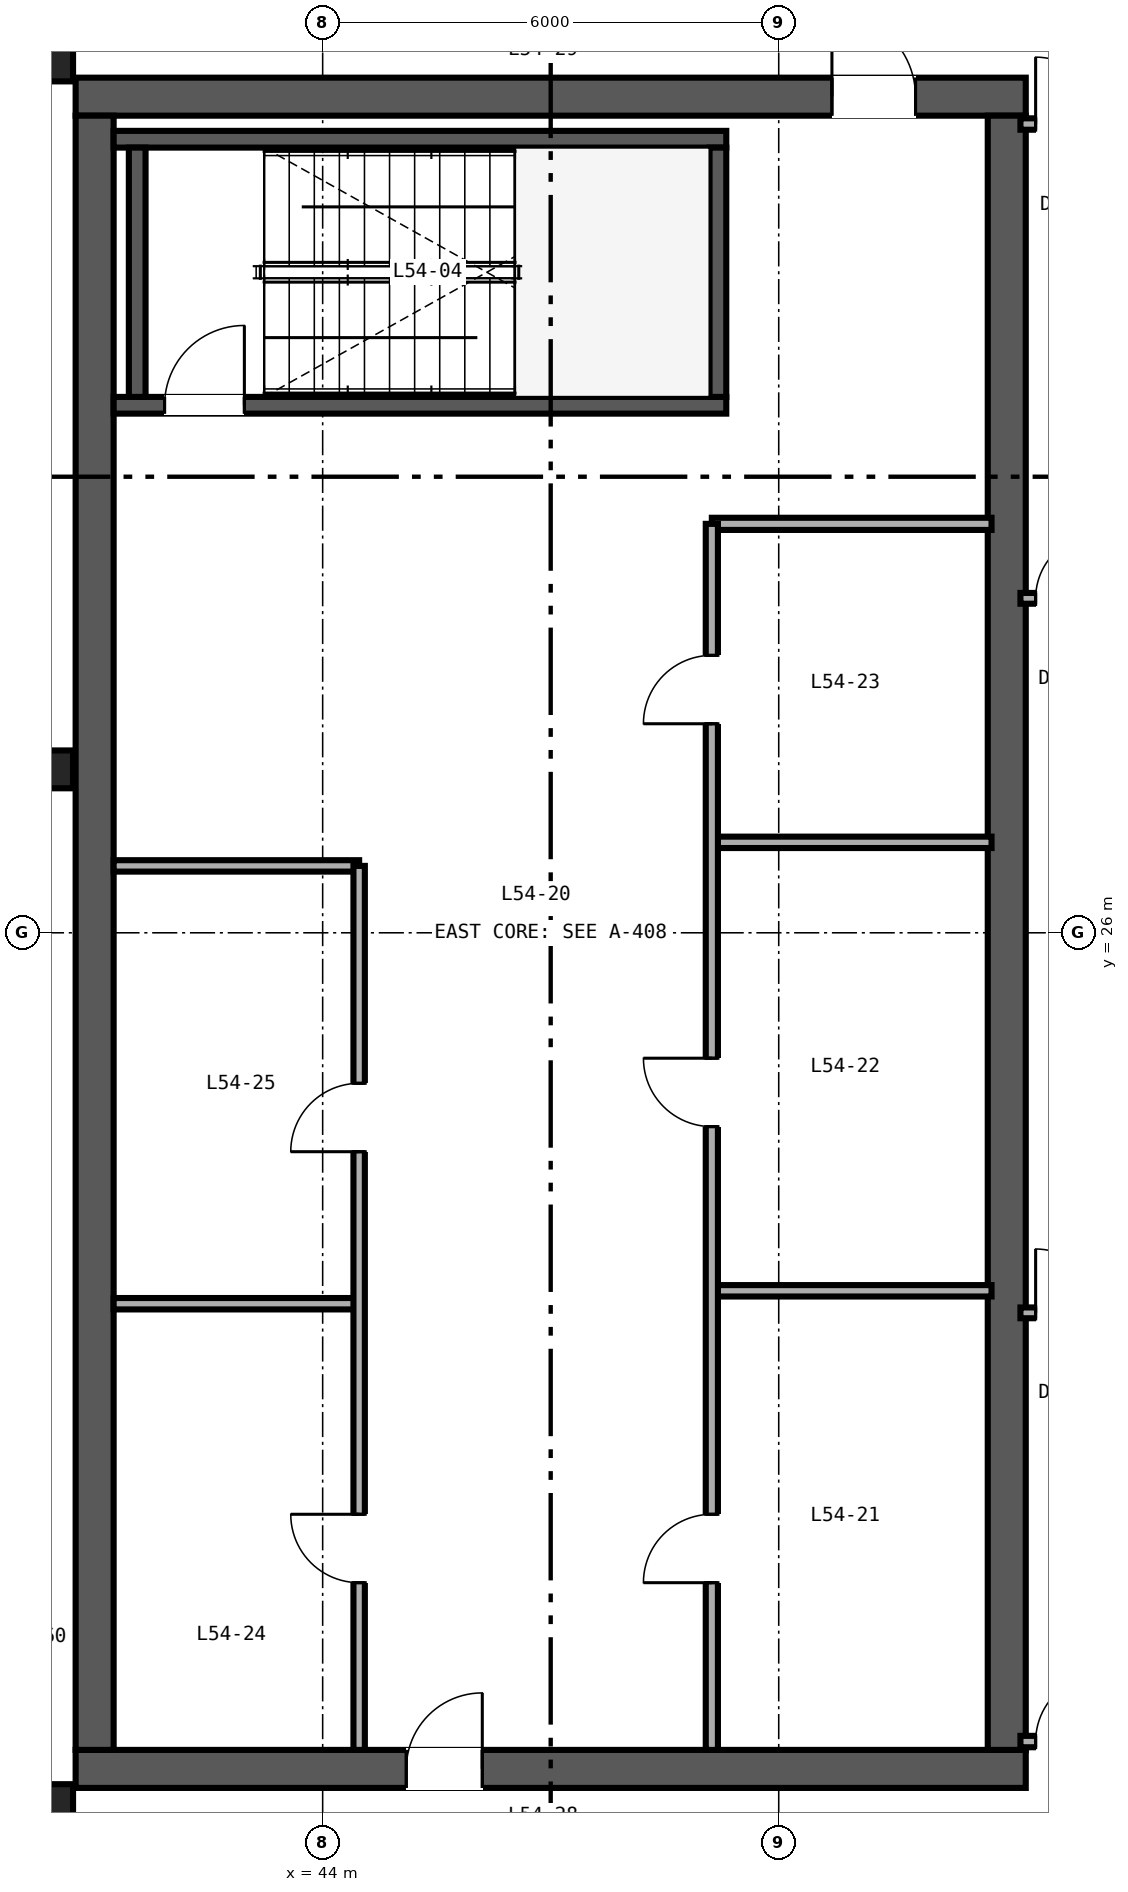
"""IFC4 building model, lengths in metres.
Left out: names, types, materials, properties, quantities, classifications, styles, units other than length and angle.
Written with IfcOpenShell. Run it as: python <this file> out.ifc"""

import sys

from ifc_helpers import new_model, si_unit, direction, frame, frame_2d, origin, origin_2d, place, context, subcontext, project, spatial, rectangle, i_section, extrude, source, transform, mapped, element, fill, save


model = new_model("IFC4")
c1 = context("Model", 3, precision=1e-05, world=origin(), true_north=direction((0.0, 1.0)))
c2 = subcontext(c1, "Body", "Model", "MODEL_VIEW")
j1 = project(units=[si_unit("LENGTHUNIT", "METRE"), si_unit("PLANEANGLEUNIT", "RADIAN")], contexts=[c1])
p1 = place(None, origin())
s1 = spatial("IfcSite", under=j1, at=p1, CompositionType="ELEMENT")
p2 = place(p1, origin())
s2 = spatial("IfcBuilding", under=s1, at=p2, CompositionType="ELEMENT")
p3 = place(p2, frame((0.0, 0.0, 213.6)))
s3 = spatial("IfcBuildingStorey", under=s2, at=p3, CompositionType="ELEMENT", Elevation=213.6)
p4 = place(p3, frame((40.75, 15.0, 0.0), z_axis=(0.0, 0.0, 1.0), x_axis=(1.0, 0.0, 0.0)))
e1 = element("IfcWall", 1, at=p4, inside=s3, PredefinedType="SHEAR", context=c2, shape_type="SweptSolid", body=[
    extrude(rectangle(XDim=12.5, YDim=0.5, at=frame_2d((6.25, 0.0))), origin(), (0.0, 0.0, 1.0), 3.37),
])
p5 = place(p4, frame((4.35, 0.0, 0.0)))
e2 = element("IfcOpeningElement", 2, at=p5, cuts=e1, PredefinedType="OPENING", context=c2, shape_type="SweptSolid", body=[
    extrude(rectangle(XDim=1.0, YDim=2.15, at=frame_2d((0.5, 1.075))), frame((0.0, 0.26, 0.0), z_axis=(0.0, -1.0, 0.0), x_axis=(1.0, 0.0, 0.0)), (0.0, 0.0, 1.0), 0.52),
])
p6 = place(p3, frame((40.75, 37.0, 0.0), z_axis=(0.0, 0.0, 1.0), x_axis=(1.0, 0.0, 0.0)))
e3 = element("IfcWall", 3, at=p6, inside=s3, PredefinedType="SHEAR", context=c2, shape_type="SweptSolid", body=[
    extrude(rectangle(XDim=12.5, YDim=0.5, at=frame_2d((6.25, 0.0))), origin(), (0.0, 0.0, 1.0), 3.37),
])
p7 = place(p6, frame((9.95, 0.0, 0.0)))
e4 = element("IfcOpeningElement", 4, at=p7, cuts=e3, PredefinedType="OPENING", context=c2, shape_type="SweptSolid", body=[
    extrude(rectangle(XDim=1.1, YDim=2.15, at=frame_2d((0.55, 1.075))), frame((0.0, 0.26, 0.0), z_axis=(0.0, -1.0, 0.0), x_axis=(1.0, 0.0, 0.0)), (0.0, 0.0, 1.0), 0.52),
])
for number, where, z_axis, x_axis in (
    (5, (41.0, 15.25, 0.0), (0.0, 0.0, 1.0), (0.0, 1.0, 0.0)),
    (6, (53.0, 15.25, 0.0), (0.0, 0.0, 1.0), (0.0, 1.0, 0.0)),
):
    element("IfcWall", number, at=place(p3, frame(where, z_axis=z_axis, x_axis=x_axis)), inside=s3, PredefinedType="SHEAR", context=c2, shape_type="SweptSolid", body=[
        extrude(rectangle(XDim=21.5, YDim=0.5, at=frame_2d((10.75, 0.0))), origin(), (0.0, 0.0, 1.0), 3.37),
    ])
p8 = place(p3, frame((41.25, 32.94, 0.0), z_axis=(0.0, 0.0, 1.0), x_axis=(1.0, 0.0, 0.0)))
e7 = element("IfcWall", 7, at=p8, inside=s3, PredefinedType="SHEAR", context=c2, shape_type="SweptSolid", body=[
    extrude(rectangle(XDim=8.06, YDim=0.22, at=frame_2d((4.03, 0.0))), origin(), (0.0, 0.0, 1.0), 3.4),
])
p9 = place(p8, frame((0.67, 0.0, 0.0)))
e8 = element("IfcOpeningElement", 8, at=p9, cuts=e7, PredefinedType="OPENING", context=c2, shape_type="SweptSolid", body=[
    extrude(rectangle(XDim=1.05, YDim=2.15, at=frame_2d((0.525, 1.075))), frame((0.0, 0.12, 0.0), z_axis=(0.0, -1.0, 0.0), x_axis=(1.0, 0.0, 0.0)), (0.0, 0.0, 1.0), 0.24),
])
p10 = place(p3, frame((41.25, 36.44, 0.0), z_axis=(0.0, 0.0, 1.0), x_axis=(1.0, 0.0, 0.0)))
e9 = element("IfcWall", 9, at=p10, inside=s3, PredefinedType="SHEAR", context=c2, shape_type="SweptSolid", body=[
    extrude(rectangle(XDim=8.06, YDim=0.22, at=frame_2d((4.03, 0.0))), origin(), (0.0, 0.0, 1.0), 3.4),
])
for number, where, z_axis, x_axis in (
    (10, (41.56, 33.05, 0.0), (0.0, 0.0, 1.0), (0.0, 1.0, 0.0)),
    (11, (49.2, 33.05, 0.0), (0.0, 0.0, 1.0), (0.0, 1.0, 0.0)),
):
    element("IfcWall", number, at=place(p3, frame(where, z_axis=z_axis, x_axis=x_axis)), inside=s3, PredefinedType="SHEAR", context=c2, shape_type="SweptSolid", body=[
        extrude(rectangle(XDim=3.28, YDim=0.22, at=frame_2d((1.64, 0.0))), origin(), (0.0, 0.0, 1.0), 3.4),
    ])
m1 = source(origin(), c2, "Body", "SweptSolid", [
    extrude(i_section(OverallWidth=0.432, OverallDepth=0.498, WebThickness=0.056, FlangeThickness=0.089, FilletRadius=0.025, at=origin_2d()), origin(), (0.0, 0.0, 1.0), 3.37),
])
for number, where, z_axis, x_axis in (
    (12, (40.5, 14.55, 0.0), (0.0, 0.0, 1.0), (1.0, 0.0, 0.0)),
    (13, (40.5, 28.15, 0.0), (0.0, 0.0, 1.0), (1.0, 0.0, 0.0)),
    (14, (40.5, 37.45, 0.0), (0.0, 0.0, 1.0), (1.0, 0.0, 0.0)),
):
    element("IfcColumn", number, at=place(p3, frame(where, z_axis=z_axis, x_axis=x_axis)), inside=s3, PredefinedType="COLUMN", context=c2, shape_type="MappedRepresentation", body=[
        mapped(m1, transform((0.0, 0.0, 0.0), scale=1.0)),
    ])
p11 = place(p3, frame((49.12, 31.38, 0.0), z_axis=(0.0, 0.0, 1.0), x_axis=(1.0, 0.0, 0.0)))
e15 = element("IfcWall", 15, at=p11, inside=s3, PredefinedType="PARTITIONING", context=c2, shape_type="SweptSolid", body=[
    extrude(rectangle(XDim=3.68, YDim=0.16, at=frame_2d((1.84, 0.0))), origin(), (0.0, 0.0, 1.0), 2.47),
])
for number, where, z_axis, x_axis in (
    (16, (49.12, 21.29, 0.0), (0.0, 0.0, 1.0), (1.0, 0.0, 0.0)),
    (17, (49.12, 27.19, 0.0), (0.0, 0.0, 1.0), (1.0, 0.0, 0.0)),
):
    element("IfcWall", number, at=place(p3, frame(where, z_axis=z_axis, x_axis=x_axis)), inside=s3, PredefinedType="PARTITIONING", context=c2, shape_type="SweptSolid", body=[
        extrude(rectangle(XDim=3.68, YDim=0.15, at=frame_2d((1.84, 0.0))), origin(), (0.0, 0.0, 1.0), 3.37),
    ])
p12 = place(p3, frame((49.12, 15.25, 0.0), z_axis=(0.0, 0.0, 1.0), x_axis=(0.0, 1.0, 0.0)))
e18 = element("IfcWall", 18, at=p12, inside=s3, PredefinedType="PARTITIONING", context=c2, shape_type="SweptSolid", body=[
    extrude(rectangle(XDim=16.13, YDim=0.16, at=frame_2d((8.065, 0.0))), origin(), (0.0, 0.0, 1.0), 2.443),
])
p13 = place(p12, frame((2.2, 0.0, 0.0)))
e19 = element("IfcOpeningElement", 19, at=p13, cuts=e18, PredefinedType="OPENING", context=c2, shape_type="SweptSolid", body=[
    extrude(rectangle(XDim=0.9, YDim=2.15, at=frame_2d((0.45, 1.075))), frame((0.0, 0.09, 0.0), z_axis=(0.0, -1.0, 0.0), x_axis=(1.0, 0.0, 0.0)), (0.0, 0.0, 1.0), 0.18),
])
p14 = place(p12, frame((8.2, 0.0, 0.0)))
e20 = element("IfcOpeningElement", 20, at=p14, cuts=e18, PredefinedType="OPENING", context=c2, shape_type="SweptSolid", body=[
    extrude(rectangle(XDim=0.9, YDim=2.15, at=frame_2d((0.45, 1.075))), frame((0.0, 0.09, 0.0), z_axis=(0.0, -1.0, 0.0), x_axis=(1.0, 0.0, 0.0)), (0.0, 0.0, 1.0), 0.18),
])
p15 = place(p12, frame((13.5, 0.0, 0.0)))
e21 = element("IfcOpeningElement", 21, at=p15, cuts=e18, PredefinedType="OPENING", context=c2, shape_type="SweptSolid", body=[
    extrude(rectangle(XDim=0.9, YDim=2.15, at=frame_2d((0.45, 1.075))), frame((0.0, 0.09, 0.0), z_axis=(0.0, -1.0, 0.0), x_axis=(1.0, 0.0, 0.0)), (0.0, 0.0, 1.0), 0.18),
])
for number, where, z_axis, x_axis in (
    (22, (41.25, 26.88, 0.0), (0.0, 0.0, 1.0), (1.0, 0.0, 0.0)),
    (23, (41.25, 21.12, 0.0), (0.0, 0.0, 1.0), (1.0, 0.0, 0.0)),
):
    element("IfcWall", number, at=place(p3, frame(where, z_axis=z_axis, x_axis=x_axis)), inside=s3, PredefinedType="PARTITIONING", context=c2, shape_type="SweptSolid", body=[
        extrude(rectangle(XDim=3.23, YDim=0.15, at=frame_2d((1.615, 0.0))), origin(), (0.0, 0.0, 1.0), 3.37),
    ])
p16 = place(p3, frame((44.48, 15.25, 0.0), z_axis=(0.0, 0.0, 1.0), x_axis=(0.0, 1.0, 0.0)))
e24 = element("IfcWall", 24, at=p16, inside=s3, PredefinedType="PARTITIONING", context=c2, shape_type="SweptSolid", body=[
    extrude(rectangle(XDim=11.63, YDim=0.15, at=frame_2d((5.815, 0.0))), origin(), (0.0, 0.0, 1.0), 3.37),
])
p17 = place(p16, frame((2.2, 0.0, 0.0)))
e25 = element("IfcOpeningElement", 25, at=p17, cuts=e24, PredefinedType="OPENING", context=c2, shape_type="SweptSolid", body=[
    extrude(rectangle(XDim=0.9, YDim=2.15, at=frame_2d((0.45, 1.075))), frame((0.0, 0.085, 0.0), z_axis=(0.0, -1.0, 0.0), x_axis=(1.0, 0.0, 0.0)), (0.0, 0.0, 1.0), 0.17),
])
p18 = place(p16, frame((7.87, 0.0, 0.0)))
e26 = element("IfcOpeningElement", 26, at=p18, cuts=e24, PredefinedType="OPENING", context=c2, shape_type="SweptSolid", body=[
    extrude(rectangle(XDim=0.9, YDim=2.15, at=frame_2d((0.45, 1.075))), frame((0.0, 0.085, 0.0), z_axis=(0.0, -1.0, 0.0), x_axis=(1.0, 0.0, 0.0)), (0.0, 0.0, 1.0), 0.17),
])
p19 = place(p3, frame((53.18, 15.36, 0.0), z_axis=(0.0, 0.0, 1.0), x_axis=(1.0, 0.0, 0.0)))
e27 = element("IfcWall", 27, at=p19, inside=s3, PredefinedType="PARTITIONING", context=c2, shape_type="SweptSolid", body=[
    extrude(rectangle(XDim=2.66, YDim=0.15, at=frame_2d((1.33, 0.0))), origin(), (0.0, 0.0, 1.0), 2.591),
])
p20 = place(p19, frame((0.2, 0.0, 0.0)))
e28 = element("IfcOpeningElement", 28, at=p20, cuts=e27, PredefinedType="OPENING", context=c2, shape_type="SweptSolid", body=[
    extrude(rectangle(XDim=0.88, YDim=2.15, at=frame_2d((0.44, 1.075))), frame((0.0, 0.085, 0.0), z_axis=(0.0, -1.0, 0.0), x_axis=(1.0, 0.0, 0.0)), (0.0, 0.0, 1.0), 0.17),
])
p21 = place(p3, frame((53.18, 36.64, 0.0), z_axis=(0.0, 0.0, 1.0), x_axis=(1.0, 0.0, 0.0)))
e29 = element("IfcWall", 29, at=p21, inside=s3, PredefinedType="PARTITIONING", context=c2, shape_type="SweptSolid", body=[
    extrude(rectangle(XDim=2.66, YDim=0.15, at=frame_2d((1.33, 0.0))), origin(), (0.0, 0.0, 1.0), 2.753),
])
p22 = place(p21, frame((0.2, 0.0, 0.0)))
e30 = element("IfcOpeningElement", 30, at=p22, cuts=e29, PredefinedType="OPENING", context=c2, shape_type="SweptSolid", body=[
    extrude(rectangle(XDim=0.88, YDim=2.15, at=frame_2d((0.44, 1.075))), frame((0.0, 0.085, 0.0), z_axis=(0.0, -1.0, 0.0), x_axis=(1.0, 0.0, 0.0)), (0.0, 0.0, 1.0), 0.17),
])
p23 = place(p3, frame((53.18, 21.0, 0.0), z_axis=(0.0, 0.0, 1.0), x_axis=(1.0, 0.0, 0.0)))
e31 = element("IfcWall", 31, at=p23, inside=s3, PredefinedType="PARTITIONING", context=c2, shape_type="SweptSolid", body=[
    extrude(rectangle(XDim=2.66, YDim=0.142, at=frame_2d((1.33, 0.0))), origin(), (0.0, 0.0, 1.0), 2.591),
])
p24 = place(p23, frame((0.2, 0.0, 0.0)))
e32 = element("IfcOpeningElement", 32, at=p24, cuts=e31, PredefinedType="OPENING", context=c2, shape_type="SweptSolid", body=[
    extrude(rectangle(XDim=0.84, YDim=2.1, at=frame_2d((0.42, 1.05))), frame((0.0, 0.081, 0.0), z_axis=(0.0, -1.0, 0.0), x_axis=(1.0, 0.0, 0.0)), (0.0, 0.0, 1.0), 0.162),
])
p25 = place(p3, frame((53.18, 30.4, 0.0), z_axis=(0.0, 0.0, 1.0), x_axis=(1.0, 0.0, 0.0)))
e33 = element("IfcWall", 33, at=p25, inside=s3, PredefinedType="PARTITIONING", context=c2, shape_type="SweptSolid", body=[
    extrude(rectangle(XDim=2.66, YDim=0.142, at=frame_2d((1.33, 0.0))), origin(), (0.0, 0.0, 1.0), 2.753),
])
p26 = place(p25, frame((0.2, 0.0, 0.0)))
e34 = element("IfcOpeningElement", 34, at=p26, cuts=e33, PredefinedType="OPENING", context=c2, shape_type="SweptSolid", body=[
    extrude(rectangle(XDim=0.84, YDim=2.1, at=frame_2d((0.42, 1.05))), frame((0.0, 0.081, 0.0), z_axis=(0.0, -1.0, 0.0), x_axis=(1.0, 0.0, 0.0)), (0.0, 0.0, 1.0), 0.162),
])
m2 = source(origin(), c2, "Body", "SweptSolid", [
    extrude(rectangle(XDim=1.05, YDim=2.15, at=frame_2d((0.525, 1.075))), frame((0.0, 0.025, 0.0), z_axis=(0.0, -1.0, 0.0), x_axis=(1.0, 0.0, 0.0)), (0.0, 0.0, 1.0), 0.05),
])
p27 = place(p9, origin())
e35 = element("IfcDoor", 35, at=p27, inside=s3, OperationType="SINGLE_SWING_RIGHT", PredefinedType="DOOR", context=c2, shape_type="MappedRepresentation", body=[
    mapped(m2, transform((0.0, 0.0, 0.0), scale=1.0)),
])
fill(e8, e35)
m3 = source(origin(), c2, "Body", "SweptSolid", [
    extrude(rectangle(XDim=1.0, YDim=2.15, at=frame_2d((0.5, 1.075))), frame((0.0, 0.025, 0.0), z_axis=(0.0, -1.0, 0.0), x_axis=(1.0, 0.0, 0.0)), (0.0, 0.0, 1.0), 0.05),
])
p28 = place(p5, origin())
e36 = element("IfcDoor", 36, at=p28, inside=s3, OperationType="SINGLE_SWING_RIGHT", PredefinedType="DOOR", context=c2, shape_type="MappedRepresentation", body=[
    mapped(m3, transform((0.0, 0.0, 0.0), scale=1.0)),
])
fill(e2, e36)
m4 = source(origin(), c2, "Body", "SweptSolid", [
    extrude(rectangle(XDim=1.1, YDim=2.15, at=frame_2d((0.55, 1.075))), frame((0.0, 0.025, 0.0), z_axis=(0.0, -1.0, 0.0), x_axis=(1.0, 0.0, 0.0)), (0.0, 0.0, 1.0), 0.05),
])
p29 = place(p7, origin())
e37 = element("IfcDoor", 37, at=p29, inside=s3, OperationType="SINGLE_SWING_LEFT", PredefinedType="DOOR", context=c2, shape_type="MappedRepresentation", body=[
    mapped(m4, transform((0.0, 0.0, 0.0), scale=1.0)),
])
fill(e4, e37)
m5 = source(origin(), c2, "Body", "SweptSolid", [
    extrude(rectangle(XDim=0.9, YDim=2.15, at=frame_2d((0.45, 1.075))), frame((0.0, 0.025, 0.0), z_axis=(0.0, -1.0, 0.0), x_axis=(1.0, 0.0, 0.0)), (0.0, 0.0, 1.0), 0.05),
])
p30 = place(p13, origin())
e38 = element("IfcDoor", 38, at=p30, inside=s3, OperationType="SINGLE_SWING_LEFT", PredefinedType="DOOR", context=c2, shape_type="MappedRepresentation", body=[
    mapped(m5, transform((0.0, 0.0, 0.0), scale=1.0)),
])
fill(e19, e38)
p31 = place(p14, origin())
e39 = element("IfcDoor", 39, at=p31, inside=s3, OperationType="SINGLE_SWING_RIGHT", PredefinedType="DOOR", context=c2, shape_type="MappedRepresentation", body=[
    mapped(m5, transform((0.0, 0.0, 0.0), scale=1.0)),
])
fill(e20, e39)
p32 = place(p15, origin())
e40 = element("IfcDoor", 40, at=p32, inside=s3, OperationType="SINGLE_SWING_LEFT", PredefinedType="DOOR", context=c2, shape_type="MappedRepresentation", body=[
    mapped(m5, transform((0.0, 0.0, 0.0), scale=1.0)),
])
fill(e21, e40)
p33 = place(p17, origin())
e41 = element("IfcDoor", 41, at=p33, inside=s3, OperationType="SINGLE_SWING_RIGHT", PredefinedType="DOOR", context=c2, shape_type="MappedRepresentation", body=[
    mapped(m5, transform((0.0, 0.0, 0.0), scale=1.0)),
])
fill(e25, e41)
p34 = place(p18, origin())
e42 = element("IfcDoor", 42, at=p34, inside=s3, OperationType="SINGLE_SWING_LEFT", PredefinedType="DOOR", context=c2, shape_type="MappedRepresentation", body=[
    mapped(m5, transform((0.0, 0.0, 0.0), scale=1.0)),
])
fill(e26, e42)
m6 = source(origin(), c2, "Body", "SweptSolid", [
    extrude(rectangle(XDim=0.88, YDim=2.15, at=frame_2d((0.44, 1.075))), frame((0.0, 0.025, 0.0), z_axis=(0.0, -1.0, 0.0), x_axis=(1.0, 0.0, 0.0)), (0.0, 0.0, 1.0), 0.05),
])
p35 = place(p20, origin())
e43 = element("IfcDoor", 43, at=p35, inside=s3, OperationType="SINGLE_SWING_RIGHT", PredefinedType="DOOR", context=c2, shape_type="MappedRepresentation", body=[
    mapped(m6, transform((0.0, 0.0, 0.0), scale=1.0)),
])
fill(e28, e43)
p36 = place(p22, origin())
e44 = element("IfcDoor", 44, at=p36, inside=s3, OperationType="SINGLE_SWING_LEFT", PredefinedType="DOOR", context=c2, shape_type="MappedRepresentation", body=[
    mapped(m6, transform((0.0, 0.0, 0.0), scale=1.0)),
])
fill(e30, e44)
m7 = source(origin(), c2, "Body", "SweptSolid", [
    extrude(rectangle(XDim=0.84, YDim=2.1, at=frame_2d((0.42, 1.05))), frame((0.0, 0.025, 0.0), z_axis=(0.0, -1.0, 0.0), x_axis=(1.0, 0.0, 0.0)), (0.0, 0.0, 1.0), 0.05),
])
p37 = place(p24, origin())
e45 = element("IfcDoor", 45, at=p37, inside=s3, OperationType="SINGLE_SWING_LEFT", PredefinedType="DOOR", context=c2, shape_type="MappedRepresentation", body=[
    mapped(m7, transform((0.0, 0.0, 0.0), scale=1.0)),
])
fill(e32, e45)
p38 = place(p26, origin())
e46 = element("IfcDoor", 46, at=p38, inside=s3, OperationType="SINGLE_SWING_RIGHT", PredefinedType="DOOR", context=c2, shape_type="MappedRepresentation", body=[
    mapped(m7, transform((0.0, 0.0, 0.0), scale=1.0)),
])
fill(e34, e46)
save(model, sys.argv[1])
